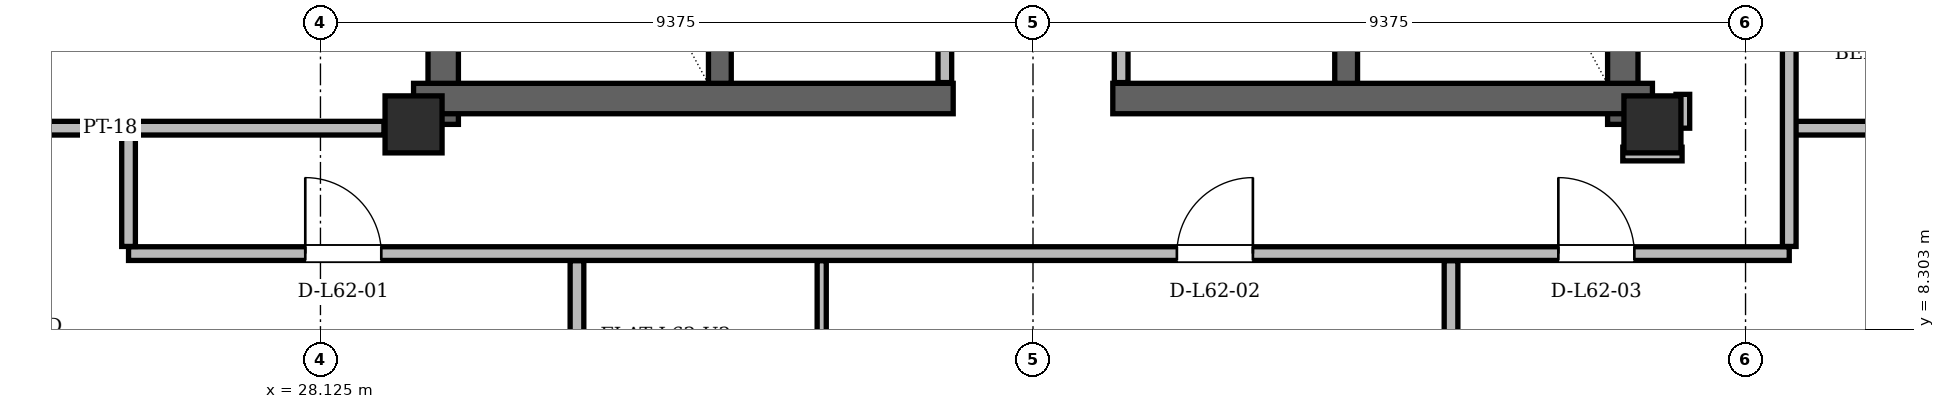
"""IFC4 building model, lengths in metres.
Left out: names, types, materials, properties, quantities, classifications, styles, units other than length and angle.
Written with IfcOpenShell. Run it as: python <this file> out.ifc"""

import sys

from ifc_helpers import new_model, si_unit, direction, frame, frame_2d, origin, origin_2d, place, context, subcontext, project, spatial, rectangle, hollow_rectangle, extrude, element, fill, save


model = new_model("IFC4")
c1 = context("Model", 3, precision=1e-05, world=origin(), true_north=direction((0.0, 1.0)))
c2 = subcontext(c1, "Body", "Model", "MODEL_VIEW")
j1 = project(units=[si_unit("LENGTHUNIT", "METRE"), si_unit("PLANEANGLEUNIT", "RADIAN")], contexts=[c1])
p1 = place(None, origin())
s1 = spatial("IfcSite", under=j1, at=p1, CompositionType="ELEMENT")
p2 = place(p1, origin())
s2 = spatial("IfcBuilding", under=s1, at=p2, CompositionType="ELEMENT")
p3 = place(p2, frame((0.0, 0.0, 234.3)))
s3 = spatial("IfcBuildingStorey", under=s2, at=p3, CompositionType="ELEMENT", Elevation=234.3)
for number, where, z_axis, x_axis in (
    (1, (29.35, 11.0, 0.0), (0.0, 0.0, 1.0), (1.0, 0.0, 0.0)),
    (2, (45.65, 11.0, 0.0), (0.0, 0.0, 1.0), (1.0, 0.0, 0.0)),
):
    element("IfcColumn", number, at=place(p3, frame(where, z_axis=z_axis, x_axis=x_axis)), inside=s3, PredefinedType="COLUMN", context=c2, shape_type="SweptSolid", body=[
        extrude(hollow_rectangle(XDim=0.75, YDim=0.75, WallThickness=0.06, at=origin_2d()), origin(), (0.0, 0.0, 1.0), 3.6),
    ])
for number, where, z_axis, x_axis in (
    (3, (29.74, 11.0, 0.0), (0.0, 0.0, 1.0), (0.0, 1.0, 0.0)),
    (4, (45.26, 11.0, 0.0), (0.0, 0.0, 1.0), (0.0, 1.0, 0.0)),
):
    element("IfcWall", number, at=place(p3, frame(where, z_axis=z_axis, x_axis=x_axis)), inside=s3, PredefinedType="SHEAR", context=c2, shape_type="SweptSolid", body=[
        extrude(rectangle(XDim=13.3, YDim=0.4, at=frame_2d((6.65, 0.0))), origin(), (0.0, 0.0, 1.0), 3.38),
    ])
for number, where, z_axis, x_axis in (
    (5, (29.35, 11.34, 0.0), (0.0, 0.0, 1.0), (1.0, 0.0, 0.0)),
    (6, (38.55, 11.34, 0.0), (0.0, 0.0, 1.0), (1.0, 0.0, 0.0)),
):
    element("IfcWall", number, at=place(p3, frame(where, z_axis=z_axis, x_axis=x_axis)), inside=s3, PredefinedType="SHEAR", context=c2, shape_type="SweptSolid", body=[
        extrude(rectangle(XDim=7.1, YDim=0.4, at=frame_2d((3.55, 0.0))), origin(), (0.0, 0.0, 1.0), 3.38),
    ])
for number, where, z_axis, x_axis in (
    (7, (33.38, 11.54, 0.0), (0.0, 0.0, 1.0), (0.0, 1.0, 0.0)),
    (8, (41.62, 11.54, 0.0), (0.0, 0.0, 1.0), (0.0, 1.0, 0.0)),
):
    element("IfcWall", number, at=place(p3, frame(where, z_axis=z_axis, x_axis=x_axis)), inside=s3, PredefinedType="SHEAR", context=c2, shape_type="SweptSolid", body=[
        extrude(rectangle(XDim=7.62, YDim=0.3, at=frame_2d((3.81, 0.0))), origin(), (0.0, 0.0, 1.0), 3.38),
    ])
p4 = place(p3, frame((58.942, 11.205, 0.0), z_axis=(0.0, 0.0, 1.0), x_axis=(-0.500000614513, 0.866025048995, 0.0)))
e9 = element("IfcWall", 9, at=p4, inside=s3, PredefinedType="SOLIDWALL", context=c2, shape_type="SweptSolid", body=[
    extrude(rectangle(XDim=36.848, YDim=0.29, at=frame_2d((18.424, 0.0))), origin(), (0.0, 0.0, 1.0), 2.677),
])
p5 = place(p4, frame((7.615, 0.0, 0.0)))
e10 = element("IfcOpeningElement", 10, at=p5, cuts=e9, PredefinedType="OPENING", context=c2, shape_type="SweptSolid", body=[
    extrude(rectangle(XDim=1.5, YDim=2.2, at=frame_2d((0.75, 1.1))), frame((0.0, 0.145, 0.0), z_axis=(0.0, -1.0, 0.0), x_axis=(1.0, 0.0, 0.0)), (0.0, 0.0, 1.0), 0.29),
])
p6 = place(p4, frame((28.658, 0.0, 0.0)))
e11 = element("IfcOpeningElement", 11, at=p6, cuts=e9, PredefinedType="OPENING", context=c2, shape_type="SweptSolid", body=[
    extrude(rectangle(XDim=1.3, YDim=2.2, at=frame_2d((0.65, 1.1))), frame((0.0, 0.145, 0.0), z_axis=(0.0, -1.0, 0.0), x_axis=(1.0, 0.0, 0.0)), (0.0, 0.0, 1.0), 0.29),
])
p7 = place(p4, frame((3.643, 0.0, 0.85)))
e12 = element("IfcOpeningElement", 12, at=p7, cuts=e9, PredefinedType="OPENING", context=c2, shape_type="SweptSolid", body=[
    extrude(rectangle(XDim=1.2, YDim=1.48, at=frame_2d((0.6, 0.74))), frame((0.0, 0.145, 0.0), z_axis=(0.0, -1.0, 0.0), x_axis=(1.0, 0.0, 0.0)), (0.0, 0.0, 1.0), 0.29),
])
p8 = place(p4, frame((1.09, 0.0, 0.85)))
e13 = element("IfcOpeningElement", 13, at=p8, cuts=e9, PredefinedType="OPENING", context=c2, shape_type="SweptSolid", body=[
    extrude(rectangle(XDim=1.6, YDim=1.7, at=frame_2d((0.8, 0.85))), frame((0.0, 0.145, 0.0), z_axis=(0.0, -1.0, 0.0), x_axis=(1.0, 0.0, 0.0)), (0.0, 0.0, 1.0), 0.29),
])
p9 = place(p4, frame((34.714, 0.0, 0.85)))
e14 = element("IfcOpeningElement", 14, at=p9, cuts=e9, PredefinedType="OPENING", context=c2, shape_type="SweptSolid", body=[
    extrude(rectangle(XDim=1.2, YDim=1.48, at=frame_2d((0.6, 0.74))), frame((0.0, 0.145, 0.0), z_axis=(0.0, -1.0, 0.0), x_axis=(1.0, 0.0, 0.0)), (0.0, 0.0, 1.0), 0.29),
])
p10 = place(p4, frame((31.648, 0.0, 0.85)))
e15 = element("IfcOpeningElement", 15, at=p10, cuts=e9, PredefinedType="OPENING", context=c2, shape_type="SweptSolid", body=[
    extrude(rectangle(XDim=1.2, YDim=1.48, at=frame_2d((0.6, 0.74))), frame((0.0, 0.145, 0.0), z_axis=(0.0, -1.0, 0.0), x_axis=(1.0, 0.0, 0.0)), (0.0, 0.0, 1.0), 0.29),
])
p11 = place(p4, frame((16.738, 0.0, 0.85)))
e16 = element("IfcOpeningElement", 16, at=p11, cuts=e9, PredefinedType="OPENING", context=c2, shape_type="SweptSolid", body=[
    extrude(rectangle(XDim=2.2, YDim=1.717, at=frame_2d((1.1, 0.858))), frame((0.0, 0.145, 0.0), z_axis=(0.0, -1.0, 0.0), x_axis=(1.0, 0.0, 0.0)), (0.0, 0.0, 1.0), 0.29),
])
p12 = place(p4, frame((22.794, 0.0, 0.85)))
e17 = element("IfcOpeningElement", 17, at=p12, cuts=e9, PredefinedType="OPENING", context=c2, shape_type="SweptSolid", body=[
    extrude(rectangle(XDim=1.6, YDim=1.7, at=frame_2d((0.8, 0.85))), frame((0.0, 0.145, 0.0), z_axis=(0.0, -1.0, 0.0), x_axis=(1.0, 0.0, 0.0)), (0.0, 0.0, 1.0), 0.29),
])
p13 = place(p4, frame((12.349, 0.0, 0.85)))
e18 = element("IfcOpeningElement", 18, at=p13, cuts=e9, PredefinedType="OPENING", context=c2, shape_type="SweptSolid", body=[
    extrude(rectangle(XDim=1.2, YDim=1.48, at=frame_2d((0.6, 0.74))), frame((0.0, 0.145, 0.0), z_axis=(0.0, -1.0, 0.0), x_axis=(1.0, 0.0, 0.0)), (0.0, 0.0, 1.0), 0.29),
])
p14 = place(p3, frame((34.482, 43.116, 0.0), z_axis=(0.0, 0.0, 1.0), x_axis=(-0.500000614513, -0.866025048995, 0.0)))
e19 = element("IfcWall", 19, at=p14, inside=s3, PredefinedType="SOLIDWALL", context=c2, shape_type="SweptSolid", body=[
    extrude(rectangle(XDim=36.848, YDim=0.29, at=frame_2d((18.424, 0.0))), origin(), (0.0, 0.0, 1.0), 2.677),
])
p15 = place(p14, frame((8.034, 0.0, 0.0)))
e20 = element("IfcOpeningElement", 20, at=p15, cuts=e19, PredefinedType="OPENING", context=c2, shape_type="SweptSolid", body=[
    extrude(rectangle(XDim=1.5, YDim=2.2, at=frame_2d((0.75, 1.1))), frame((0.0, 0.145, 0.0), z_axis=(0.0, -1.0, 0.0), x_axis=(1.0, 0.0, 0.0)), (0.0, 0.0, 1.0), 0.29),
])
p16 = place(p14, frame((28.559, 0.0, 0.0)))
e21 = element("IfcOpeningElement", 21, at=p16, cuts=e19, PredefinedType="OPENING", context=c2, shape_type="SweptSolid", body=[
    extrude(rectangle(XDim=1.5, YDim=2.2, at=frame_2d((0.75, 1.1))), frame((0.0, 0.145, 0.0), z_axis=(0.0, -1.0, 0.0), x_axis=(1.0, 0.0, 0.0)), (0.0, 0.0, 1.0), 0.29),
])
p17 = place(p14, frame((21.863, 0.0, 0.85)))
e22 = element("IfcOpeningElement", 22, at=p17, cuts=e19, PredefinedType="OPENING", context=c2, shape_type="SweptSolid", body=[
    extrude(rectangle(XDim=2.4, YDim=1.717, at=frame_2d((1.2, 0.858))), frame((0.0, 0.145, 0.0), z_axis=(0.0, -1.0, 0.0), x_axis=(1.0, 0.0, 0.0)), (0.0, 0.0, 1.0), 0.29),
])
p18 = place(p14, frame((34.677, 0.0, 0.85)))
e23 = element("IfcOpeningElement", 23, at=p18, cuts=e19, PredefinedType="OPENING", context=c2, shape_type="SweptSolid", body=[
    extrude(rectangle(XDim=1.2, YDim=1.48, at=frame_2d((0.6, 0.74))), frame((0.0, 0.145, 0.0), z_axis=(0.0, -1.0, 0.0), x_axis=(1.0, 0.0, 0.0)), (0.0, 0.0, 1.0), 0.29),
])
p19 = place(p14, frame((32.477, 0.0, 0.85)))
e24 = element("IfcOpeningElement", 24, at=p19, cuts=e19, PredefinedType="OPENING", context=c2, shape_type="SweptSolid", body=[
    extrude(rectangle(XDim=1.4, YDim=1.6, at=frame_2d((0.7, 0.8))), frame((0.0, 0.145, 0.0), z_axis=(0.0, -1.0, 0.0), x_axis=(1.0, 0.0, 0.0)), (0.0, 0.0, 1.0), 0.29),
])
p20 = place(p14, frame((12.14, 0.0, 0.85)))
e25 = element("IfcOpeningElement", 25, at=p20, cuts=e19, PredefinedType="OPENING", context=c2, shape_type="SweptSolid", body=[
    extrude(rectangle(XDim=1.2, YDim=1.48, at=frame_2d((0.6, 0.74))), frame((0.0, 0.145, 0.0), z_axis=(0.0, -1.0, 0.0), x_axis=(1.0, 0.0, 0.0)), (0.0, 0.0, 1.0), 0.29),
])
p21 = place(p14, frame((16.54, 0.0, 0.85)))
e26 = element("IfcOpeningElement", 26, at=p21, cuts=e19, PredefinedType="OPENING", context=c2, shape_type="SweptSolid", body=[
    extrude(rectangle(XDim=2.0, YDim=1.717, at=frame_2d((1.0, 0.858))), frame((0.0, 0.145, 0.0), z_axis=(0.0, -1.0, 0.0), x_axis=(1.0, 0.0, 0.0)), (0.0, 0.0, 1.0), 0.29),
])
p22 = place(p14, frame((2.059, 0.0, 0.85)))
e27 = element("IfcOpeningElement", 27, at=p22, cuts=e19, PredefinedType="OPENING", context=c2, shape_type="SweptSolid", body=[
    extrude(rectangle(XDim=1.2, YDim=1.48, at=frame_2d((0.6, 0.74))), frame((0.0, 0.145, 0.0), z_axis=(0.0, -1.0, 0.0), x_axis=(1.0, 0.0, 0.0)), (0.0, 0.0, 1.0), 0.29),
])
p23 = place(p3, frame((36.34, 11.55, 0.0), z_axis=(0.0, 0.0, 1.0), x_axis=(0.0, 1.0, 0.0)))
e28 = element("IfcWall", 28, at=p23, inside=s3, PredefinedType="PARTITIONING", context=c2, shape_type="SweptSolid", body=[
    extrude(rectangle(XDim=5.55, YDim=0.18, at=frame_2d((2.775, 0.0))), origin(), (0.0, 0.0, 1.0), 3.38),
])
p24 = place(p23, frame((0.55, 0.0, 0.0)))
e29 = element("IfcOpeningElement", 29, at=p24, cuts=e28, PredefinedType="OPENING", context=c2, shape_type="SweptSolid", body=[
    extrude(rectangle(XDim=0.88, YDim=2.08, at=frame_2d((0.44, 1.04))), frame((0.0, 0.09, 0.0), z_axis=(0.0, -1.0, 0.0), x_axis=(1.0, 0.0, 0.0)), (0.0, 0.0, 1.0), 0.18),
])
p25 = place(p23, frame((3.25, 0.0, 0.0)))
e30 = element("IfcOpeningElement", 30, at=p25, cuts=e28, PredefinedType="OPENING", context=c2, shape_type="SweptSolid", body=[
    extrude(rectangle(XDim=0.88, YDim=2.08, at=frame_2d((0.44, 1.04))), frame((0.0, 0.09, 0.0), z_axis=(0.0, -1.0, 0.0), x_axis=(1.0, 0.0, 0.0)), (0.0, 0.0, 1.0), 0.18),
])
p26 = place(p3, frame((38.66, 11.55, 0.0), z_axis=(0.0, 0.0, 1.0), x_axis=(0.0, 1.0, 0.0)))
e31 = element("IfcWall", 31, at=p26, inside=s3, PredefinedType="PARTITIONING", context=c2, shape_type="SweptSolid", body=[
    extrude(rectangle(XDim=5.55, YDim=0.18, at=frame_2d((2.775, 0.0))), origin(), (0.0, 0.0, 1.0), 3.38),
])
p27 = place(p26, frame((1.35, 0.0, 0.0)))
e32 = element("IfcOpeningElement", 32, at=p27, cuts=e31, PredefinedType="OPENING", context=c2, shape_type="SweptSolid", body=[
    extrude(rectangle(XDim=0.88, YDim=2.08, at=frame_2d((0.44, 1.04))), frame((0.0, 0.09, 0.0), z_axis=(0.0, -1.0, 0.0), x_axis=(1.0, 0.0, 0.0)), (0.0, 0.0, 1.0), 0.18),
])
p28 = place(p26, frame((4.1, 0.0, 0.0)))
e33 = element("IfcOpeningElement", 33, at=p28, cuts=e31, PredefinedType="OPENING", context=c2, shape_type="SweptSolid", body=[
    extrude(rectangle(XDim=0.88, YDim=2.08, at=frame_2d((0.44, 1.04))), frame((0.0, 0.09, 0.0), z_axis=(0.0, -1.0, 0.0), x_axis=(1.0, 0.0, 0.0)), (0.0, 0.0, 1.0), 0.18),
])
p29 = place(p3, frame((25.6, 9.3, 0.0), z_axis=(0.0, 0.0, 1.0), x_axis=(1.0, 0.0, 0.0)))
e34 = element("IfcWall", 34, at=p29, inside=s3, PredefinedType="PARTITIONING", context=c2, shape_type="SweptSolid", body=[
    extrude(rectangle(XDim=21.85, YDim=0.18, at=frame_2d((10.925, 0.0))), origin(), (0.0, 0.0, 1.0), 2.913),
])
p30 = place(p29, frame((2.325, 0.0, 0.0)))
e35 = element("IfcOpeningElement", 35, at=p30, cuts=e34, PredefinedType="OPENING", context=c2, shape_type="SweptSolid", body=[
    extrude(rectangle(XDim=1.0, YDim=2.18, at=frame_2d((0.5, 1.09))), frame((0.0, 0.09, 0.0), z_axis=(0.0, -1.0, 0.0), x_axis=(1.0, 0.0, 0.0)), (0.0, 0.0, 1.0), 0.18),
])
p31 = place(p29, frame((13.793, 0.0, 0.0)))
e36 = element("IfcOpeningElement", 36, at=p31, cuts=e34, PredefinedType="OPENING", context=c2, shape_type="SweptSolid", body=[
    extrude(rectangle(XDim=1.0, YDim=2.18, at=frame_2d((0.5, 1.09))), frame((0.0, 0.09, 0.0), z_axis=(0.0, -1.0, 0.0), x_axis=(1.0, 0.0, 0.0)), (0.0, 0.0, 1.0), 0.18),
])
p32 = place(p29, frame((18.812, 0.0, 0.0)))
e37 = element("IfcOpeningElement", 37, at=p32, cuts=e34, PredefinedType="OPENING", context=c2, shape_type="SweptSolid", body=[
    extrude(rectangle(XDim=1.0, YDim=2.18, at=frame_2d((0.5, 1.09))), frame((0.0, 0.09, 0.0), z_axis=(0.0, -1.0, 0.0), x_axis=(1.0, 0.0, 0.0)), (0.0, 0.0, 1.0), 0.18),
])
p33 = place(p3, frame((45.26, 10.61, 0.0), z_axis=(0.0, 0.0, 1.0), x_axis=(1.0, 0.0, 0.0)))
e38 = element("IfcWall", 38, at=p33, inside=s3, PredefinedType="PARTITIONING", context=c2, shape_type="SweptSolid", body=[
    extrude(rectangle(XDim=0.78, YDim=0.18, at=frame_2d((0.39, 0.0))), origin(), (0.0, 0.0, 1.0), 3.38),
])
p34 = place(p3, frame((16.445, 10.95, 0.0), z_axis=(0.0, 0.0, 1.0), x_axis=(1.0, 0.0, 0.0)))
e39 = element("IfcWall", 39, at=p34, inside=s3, PredefinedType="PARTITIONING", context=c2, shape_type="SweptSolid", body=[
    extrude(rectangle(XDim=12.515, YDim=0.18, at=frame_2d((6.258, 0.0))), origin(), (0.0, 0.0, 1.0), 2.913),
])
p35 = place(p3, frame((47.45, 10.95, 0.0), z_axis=(0.0, 0.0, 1.0), x_axis=(1.0, 0.0, 0.0)))
e40 = element("IfcWall", 40, at=p35, inside=s3, PredefinedType="PARTITIONING", context=c2, shape_type="SweptSolid", body=[
    extrude(rectangle(XDim=11.105, YDim=0.18, at=frame_2d((5.553, 0.0))), origin(), (0.0, 0.0, 1.0), 2.913),
])
p36 = place(p3, frame((25.6, 9.394, 0.0), z_axis=(0.0, 0.0, 1.0), x_axis=(0.0, 1.0, 0.0)))
e41 = element("IfcWall", 41, at=p36, inside=s3, PredefinedType="PARTITIONING", context=c2, shape_type="SweptSolid", body=[
    extrude(rectangle(XDim=1.462, YDim=0.18, at=frame_2d((0.731, 0.0))), origin(), (0.0, 0.0, 1.0), 3.38),
])
p37 = place(p3, frame((31.5, 6.127, 0.0), z_axis=(0.0, 0.0, 1.0), x_axis=(0.0, 1.0, 0.0)))
e42 = element("IfcWall", 42, at=p37, inside=s3, PredefinedType="PARTITIONING", context=c2, shape_type="SweptSolid", body=[
    extrude(rectangle(XDim=3.079, YDim=0.18, at=frame_2d((1.539, 0.0))), origin(), (0.0, 0.0, 1.0), 2.966),
])
p38 = place(p3, frame((34.72, 6.127, 0.0), z_axis=(0.0, 0.0, 1.0), x_axis=(0.0, 1.0, 0.0)))
e43 = element("IfcWall", 43, at=p38, inside=s3, PredefinedType="PARTITIONING", context=c2, shape_type="SweptSolid", body=[
    extrude(rectangle(XDim=3.079, YDim=0.12, at=frame_2d((1.539, 0.0))), origin(), (0.0, 0.0, 1.0), 3.38),
])
p39 = place(p38, frame((1.147, 0.0, 0.0)))
e44 = element("IfcOpeningElement", 44, at=p39, cuts=e43, PredefinedType="OPENING", context=c2, shape_type="SweptSolid", body=[
    extrude(rectangle(XDim=0.88, YDim=2.08, at=frame_2d((0.44, 1.04))), frame((0.0, 0.06, 0.0), z_axis=(0.0, -1.0, 0.0), x_axis=(1.0, 0.0, 0.0)), (0.0, 0.0, 1.0), 0.12),
])
p40 = place(p3, frame((43.0, 6.127, 0.0), z_axis=(0.0, 0.0, 1.0), x_axis=(0.0, 1.0, 0.0)))
e45 = element("IfcWall", 45, at=p40, inside=s3, PredefinedType="PARTITIONING", context=c2, shape_type="SweptSolid", body=[
    extrude(rectangle(XDim=3.079, YDim=0.18, at=frame_2d((1.539, 0.0))), origin(), (0.0, 0.0, 1.0), 3.38),
])
p41 = place(p3, frame((46.05, 10.95, 0.0), z_axis=(0.0, 0.0, 1.0), x_axis=(0.0, 1.0, 0.0)))
e46 = element("IfcWall", 46, at=p41, inside=s3, PredefinedType="PARTITIONING", context=c2, shape_type="SweptSolid", body=[
    extrude(rectangle(XDim=0.445, YDim=0.18, at=frame_2d((0.223, 0.0))), origin(), (0.0, 0.0, 1.0), 2.913),
])
p42 = place(p3, frame((47.45, 9.394, 0.0), z_axis=(0.0, 0.0, 1.0), x_axis=(0.0, 1.0, 0.0)))
e47 = element("IfcWall", 47, at=p42, inside=s3, PredefinedType="PARTITIONING", context=c2, shape_type="SweptSolid", body=[
    extrude(rectangle(XDim=16.482, YDim=0.18, at=frame_2d((8.241, 0.0))), origin(), (0.0, 0.0, 1.0), 2.913),
])
p43 = place(p42, frame((6.247, 0.0, 0.0)))
e48 = element("IfcOpeningElement", 48, at=p43, cuts=e47, PredefinedType="OPENING", context=c2, shape_type="SweptSolid", body=[
    extrude(rectangle(XDim=1.0, YDim=2.18, at=frame_2d((0.5, 1.09))), frame((0.0, 0.09, 0.0), z_axis=(0.0, -1.0, 0.0), x_axis=(1.0, 0.0, 0.0)), (0.0, 0.0, 1.0), 0.18),
])
p44 = place(p42, frame((10.379, 0.0, 0.0)))
e49 = element("IfcOpeningElement", 49, at=p44, cuts=e47, PredefinedType="OPENING", context=c2, shape_type="SweptSolid", body=[
    extrude(rectangle(XDim=1.0, YDim=2.18, at=frame_2d((0.5, 1.09))), frame((0.0, 0.09, 0.0), z_axis=(0.0, -1.0, 0.0), x_axis=(1.0, 0.0, 0.0)), (0.0, 0.0, 1.0), 0.18),
])
p45 = place(p30, origin())
e50 = element("IfcDoor", 50, at=p45, inside=s3, OperationType="SINGLE_SWING_LEFT", PredefinedType="DOOR", context=c2, shape_type="SweptSolid", body=[
    extrude(rectangle(XDim=1.0, YDim=2.18, at=frame_2d((0.5, 1.09))), frame((0.0, 0.025, 0.0), z_axis=(0.0, -1.0, 0.0), x_axis=(1.0, 0.0, 0.0)), (0.0, 0.0, 1.0), 0.05),
])
fill(e35, e50)
p46 = place(p31, origin())
e51 = element("IfcDoor", 51, at=p46, inside=s3, OperationType="SINGLE_SWING_RIGHT", PredefinedType="DOOR", context=c2, shape_type="SweptSolid", body=[
    extrude(rectangle(XDim=1.0, YDim=2.18, at=frame_2d((0.5, 1.09))), frame((0.0, 0.025, 0.0), z_axis=(0.0, -1.0, 0.0), x_axis=(1.0, 0.0, 0.0)), (0.0, 0.0, 1.0), 0.05),
])
fill(e36, e51)
p47 = place(p32, origin())
e52 = element("IfcDoor", 52, at=p47, inside=s3, OperationType="SINGLE_SWING_LEFT", PredefinedType="DOOR", context=c2, shape_type="SweptSolid", body=[
    extrude(rectangle(XDim=1.0, YDim=2.18, at=frame_2d((0.5, 1.09))), frame((0.0, 0.025, 0.0), z_axis=(0.0, -1.0, 0.0), x_axis=(1.0, 0.0, 0.0)), (0.0, 0.0, 1.0), 0.05),
])
fill(e37, e52)
save(model, sys.argv[1])
